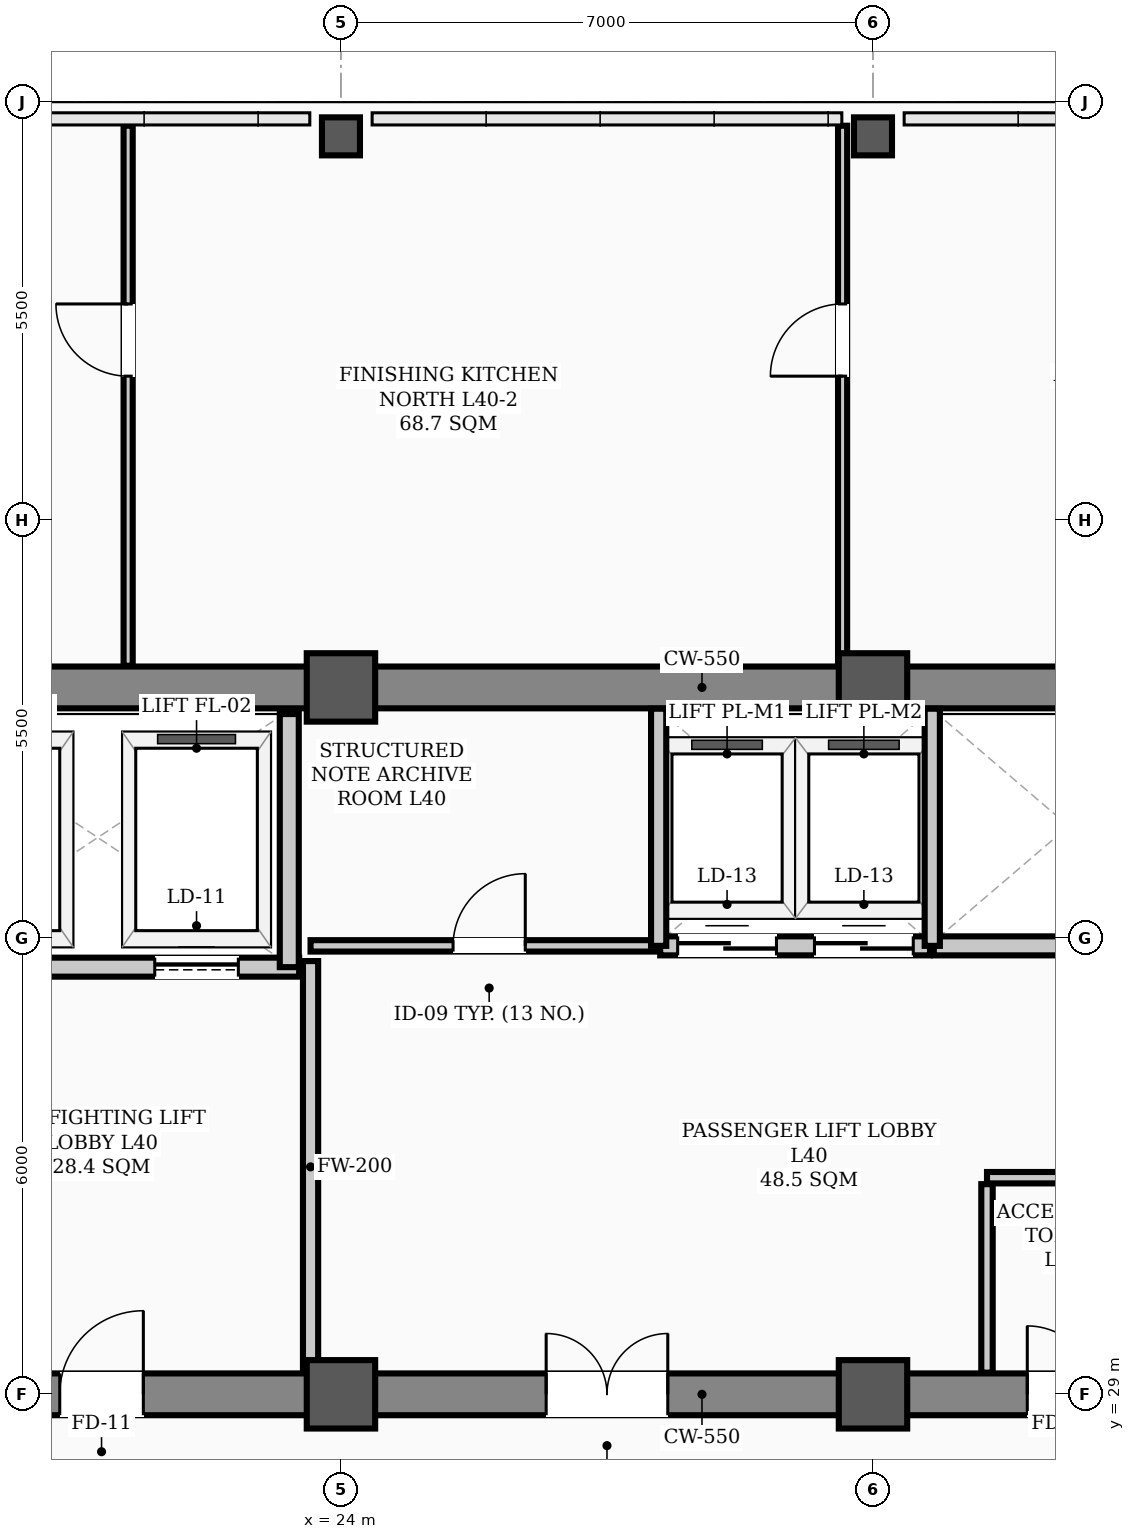
"""IFC4 building model, lengths in metres.
Left out: names, types, materials, properties, quantities, classifications, styles, units other than length and angle.
Written with IfcOpenShell. Run it as: python <this file> out.ifc"""

import sys

from ifc_helpers import new_model, si_unit, direction, frame, frame_2d, origin, origin_2d, place, context, subcontext, project, spatial, rectangle, hollow_rectangle, extrude, element, fill, save


model = new_model("IFC4")
c1 = context("Model", 3, precision=1e-05, world=origin(), true_north=direction((0.0, 1.0)))
c2 = subcontext(c1, "Body", "Model", "MODEL_VIEW")
j1 = project(units=[si_unit("LENGTHUNIT", "METRE"), si_unit("PLANEANGLEUNIT", "RADIAN")], contexts=[c1])
p1 = place(None, origin())
s1 = spatial("IfcSite", under=j1, at=p1, CompositionType="ELEMENT")
p2 = place(p1, origin())
s2 = spatial("IfcBuilding", under=s1, at=p2, CompositionType="ELEMENT")
p3 = place(p2, frame((0.0, 0.0, 161.7)))
s3 = spatial("IfcBuildingStorey", under=s2, at=p3, CompositionType="ELEMENT", Elevation=161.7)
for number, where, z_axis, x_axis in (
    (1, (24.0, 29.0, 0.0), (0.0, 0.0, 1.0), (1.0, 0.0, 0.0)),
    (2, (24.0, 38.3, 0.0), (0.0, 0.0, 1.0), (1.0, 0.0, 0.0)),
    (3, (31.0, 29.0, 0.0), (0.0, 0.0, 1.0), (1.0, 0.0, 0.0)),
    (4, (31.0, 38.3, 0.0), (0.0, 0.0, 1.0), (1.0, 0.0, 0.0)),
):
    element("IfcColumn", number, at=place(p3, frame(where, z_axis=z_axis, x_axis=x_axis)), inside=s3, PredefinedType="COLUMN", context=c2, shape_type="SweptSolid", body=[
        extrude(hollow_rectangle(XDim=0.9, YDim=0.9, WallThickness=0.035, InnerFilletRadius=0.017, OuterFilletRadius=0.052, at=origin_2d()), origin(), (0.0, 0.0, 1.0), 3.9),
    ])
for number, where, z_axis, x_axis in (
    (5, (24.0, 45.55, 0.0), (0.0, 0.0, 1.0), (1.0, 0.0, 0.0)),
    (6, (31.0, 45.55, 0.0), (0.0, 0.0, 1.0), (1.0, 0.0, 0.0)),
):
    element("IfcColumn", number, at=place(p3, frame(where, z_axis=z_axis, x_axis=x_axis)), inside=s3, PredefinedType="COLUMN", context=c2, shape_type="SweptSolid", body=[
        extrude(hollow_rectangle(XDim=0.5, YDim=0.5, WallThickness=0.024, InnerFilletRadius=0.012, OuterFilletRadius=0.036, at=origin_2d()), origin(), (0.0, 0.0, 1.0), 3.9),
    ])
p4 = place(p3, frame((13.5, 29.0, 0.0), z_axis=(0.0, 0.0, 1.0), x_axis=(1.0, 0.0, 0.0)))
e7 = element("IfcWall", 7, at=p4, inside=s3, PredefinedType="SHEAR", context=c2, shape_type="SweptSolid", body=[
    extrude(rectangle(XDim=30.5, YDim=0.55, at=frame_2d((15.25, 0.0))), origin(), (0.0, 0.0, 1.0), 3.72),
])
p5 = place(p4, frame((1.75, 0.0, 0.0)))
e8 = element("IfcOpeningElement", 8, at=p5, cuts=e7, PredefinedType="OPENING", context=c2, shape_type="SweptSolid", body=[
    extrude(rectangle(XDim=1.1, YDim=2.08, at=frame_2d((0.55, 1.04))), frame((0.0, 0.285, 0.0), z_axis=(0.0, -1.0, 0.0), x_axis=(1.0, 0.0, 0.0)), (0.0, 0.0, 1.0), 0.57),
])
p6 = place(p4, frame((26.7, 0.0, 0.0)))
e9 = element("IfcOpeningElement", 9, at=p6, cuts=e7, PredefinedType="OPENING", context=c2, shape_type="SweptSolid", body=[
    extrude(rectangle(XDim=1.1, YDim=2.08, at=frame_2d((0.55, 1.04))), frame((0.0, 0.285, 0.0), z_axis=(0.0, -1.0, 0.0), x_axis=(1.0, 0.0, 0.0)), (0.0, 0.0, 1.0), 0.57),
])
p7 = place(p4, frame((6.8, 0.0, 0.0)))
e10 = element("IfcOpeningElement", 10, at=p7, cuts=e7, PredefinedType="OPENING", context=c2, shape_type="SweptSolid", body=[
    extrude(rectangle(XDim=1.1, YDim=2.08, at=frame_2d((0.55, 1.04))), frame((0.0, 0.285, 0.0), z_axis=(0.0, -1.0, 0.0), x_axis=(1.0, 0.0, 0.0)), (0.0, 0.0, 1.0), 0.57),
])
p8 = place(p4, frame((13.2, 0.0, 0.0)))
e11 = element("IfcOpeningElement", 11, at=p8, cuts=e7, PredefinedType="OPENING", context=c2, shape_type="SweptSolid", body=[
    extrude(rectangle(XDim=1.6, YDim=2.08, at=frame_2d((0.8, 1.04))), frame((0.0, 0.285, 0.0), z_axis=(0.0, -1.0, 0.0), x_axis=(1.0, 0.0, 0.0)), (0.0, 0.0, 1.0), 0.57),
])
p9 = place(p4, frame((19.53, 0.0, 0.0)))
e12 = element("IfcOpeningElement", 12, at=p9, cuts=e7, PredefinedType="OPENING", context=c2, shape_type="SweptSolid", body=[
    extrude(rectangle(XDim=0.9, YDim=2.08, at=frame_2d((0.45, 1.04))), frame((0.0, 0.285, 0.0), z_axis=(0.0, -1.0, 0.0), x_axis=(1.0, 0.0, 0.0)), (0.0, 0.0, 1.0), 0.57),
])
p10 = place(p4, frame((21.57, 0.0, 0.0)))
e13 = element("IfcOpeningElement", 13, at=p10, cuts=e7, PredefinedType="OPENING", context=c2, shape_type="SweptSolid", body=[
    extrude(rectangle(XDim=0.9, YDim=2.08, at=frame_2d((0.45, 1.04))), frame((0.0, 0.285, 0.0), z_axis=(0.0, -1.0, 0.0), x_axis=(1.0, 0.0, 0.0)), (0.0, 0.0, 1.0), 0.57),
])
p11 = place(p3, frame((13.5, 38.3, 0.0), z_axis=(0.0, 0.0, 1.0), x_axis=(1.0, 0.0, 0.0)))
e14 = element("IfcWall", 14, at=p11, inside=s3, PredefinedType="SHEAR", context=c2, shape_type="SweptSolid", body=[
    extrude(rectangle(XDim=30.5, YDim=0.55, at=frame_2d((15.25, 0.0))), origin(), (0.0, 0.0, 1.0), 3.72),
])
p12 = place(p3, frame((18.1, 34.62, 0.0), z_axis=(0.0, 0.0, 1.0), x_axis=(1.0, 0.0, 0.0)))
e15 = element("IfcWall", 15, at=p12, inside=s3, PredefinedType="STANDARD", context=c2, shape_type="SweptSolid", body=[
    extrude(rectangle(XDim=5.35, YDim=0.25, at=frame_2d((2.675, 0.0))), origin(), (0.0, 0.0, 1.0), 3.72),
])
p13 = place(p12, frame((0.85, 0.0, 0.0)))
e16 = element("IfcOpeningElement", 16, at=p13, cuts=e15, PredefinedType="OPENING", context=c2, shape_type="SweptSolid", body=[
    extrude(rectangle(XDim=1.1, YDim=2.08, at=frame_2d((0.55, 1.04))), frame((0.0, 0.135, 0.0), z_axis=(0.0, -1.0, 0.0), x_axis=(1.0, 0.0, 0.0)), (0.0, 0.0, 1.0), 0.27),
])
p14 = place(p12, frame((3.45, 0.0, 0.0)))
e17 = element("IfcOpeningElement", 17, at=p14, cuts=e15, PredefinedType="OPENING", context=c2, shape_type="SweptSolid", body=[
    extrude(rectangle(XDim=1.1, YDim=2.08, at=frame_2d((0.55, 1.04))), frame((0.0, 0.135, 0.0), z_axis=(0.0, -1.0, 0.0), x_axis=(1.0, 0.0, 0.0)), (0.0, 0.0, 1.0), 0.27),
])
p15 = place(p3, frame((23.32, 34.62, 0.0), z_axis=(0.0, 0.0, 1.0), x_axis=(0.0, 1.0, 0.0)))
e18 = element("IfcWall", 18, at=p15, inside=s3, PredefinedType="STANDARD", context=c2, shape_type="SweptSolid", body=[
    extrude(rectangle(XDim=3.33, YDim=0.25, at=frame_2d((1.665, 0.0))), origin(), (0.0, 0.0, 1.0), 3.35),
])
p16 = place(p3, frame((28.2, 34.9, 0.0), z_axis=(0.0, 0.0, 1.0), x_axis=(1.0, 0.0, 0.0)))
e19 = element("IfcWall", 19, at=p16, inside=s3, PredefinedType="STANDARD", context=c2, shape_type="SweptSolid", body=[
    extrude(rectangle(XDim=3.55, YDim=0.25, at=frame_2d((1.775, 0.0))), origin(), (0.0, 0.0, 1.0), 3.72),
])
p17 = place(p16, frame((0.23, 0.0, 0.0)))
e20 = element("IfcOpeningElement", 20, at=p17, cuts=e19, PredefinedType="OPENING", context=c2, shape_type="SweptSolid", body=[
    extrude(rectangle(XDim=1.3, YDim=2.08, at=frame_2d((0.65, 1.04))), frame((0.0, 0.135, 0.0), z_axis=(0.0, -1.0, 0.0), x_axis=(1.0, 0.0, 0.0)), (0.0, 0.0, 1.0), 0.27),
])
p18 = place(p16, frame((2.03, 0.0, 0.0)))
e21 = element("IfcOpeningElement", 21, at=p18, cuts=e19, PredefinedType="OPENING", context=c2, shape_type="SweptSolid", body=[
    extrude(rectangle(XDim=1.3, YDim=2.08, at=frame_2d((0.65, 1.04))), frame((0.0, 0.135, 0.0), z_axis=(0.0, -1.0, 0.0), x_axis=(1.0, 0.0, 0.0)), (0.0, 0.0, 1.0), 0.27),
])
p19 = place(p3, frame((31.8, 34.9, 0.0), z_axis=(0.0, 0.0, 1.0), x_axis=(1.0, 0.0, 0.0)))
e22 = element("IfcWall", 22, at=p19, inside=s3, PredefinedType="STANDARD", context=c2, shape_type="SweptSolid", body=[
    extrude(rectangle(XDim=3.6, YDim=0.25, at=frame_2d((1.8, 0.0))), origin(), (0.0, 0.0, 1.0), 3.72),
])
p20 = place(p3, frame((23.6, 34.9, 0.0), z_axis=(0.0, 0.0, 1.0), x_axis=(1.0, 0.0, 0.0)))
e23 = element("IfcWall", 23, at=p20, inside=s3, PredefinedType="PARTITIONING", context=c2, shape_type="SweptSolid", body=[
    extrude(rectangle(XDim=4.58, YDim=0.15, at=frame_2d((2.29, 0.0))), origin(), (0.0, 0.0, 1.0), 3.72),
])
p21 = place(p20, frame((1.875, 0.0, 0.0)))
e24 = element("IfcOpeningElement", 24, at=p21, cuts=e23, PredefinedType="OPENING", context=c2, shape_type="SweptSolid", body=[
    extrude(rectangle(XDim=0.95, YDim=2.08, at=frame_2d((0.475, 1.04))), frame((0.0, 0.085, 0.0), z_axis=(0.0, -1.0, 0.0), x_axis=(1.0, 0.0, 0.0)), (0.0, 0.0, 1.0), 0.17),
])
p22 = place(p3, frame((32.5, 31.85, 0.0), z_axis=(0.0, 0.0, 1.0), x_axis=(1.0, 0.0, 0.0)))
e25 = element("IfcWall", 25, at=p22, inside=s3, PredefinedType="PARTITIONING", context=c2, shape_type="SweptSolid", body=[
    extrude(rectangle(XDim=4.1, YDim=0.15, at=frame_2d((2.05, 0.0))), origin(), (0.0, 0.0, 1.0), 3.72),
])
p23 = place(p3, frame((23.6, 29.285, 0.0), z_axis=(0.0, 0.0, 1.0), x_axis=(0.0, 1.0, 0.0)))
e26 = element("IfcWall", 26, at=p23, inside=s3, PredefinedType="STANDARD", context=c2, shape_type="SweptSolid", body=[
    extrude(rectangle(XDim=5.415, YDim=0.2, at=frame_2d((2.708, 0.0))), origin(), (0.0, 0.0, 1.0), 3.2),
])
p24 = place(p3, frame((32.5, 29.285, 0.0), z_axis=(0.0, 0.0, 1.0), x_axis=(0.0, 1.0, 0.0)))
e27 = element("IfcWall", 27, at=p24, inside=s3, PredefinedType="PARTITIONING", context=c2, shape_type="SweptSolid", body=[
    extrude(rectangle(XDim=2.48, YDim=0.15, at=frame_2d((1.24, 0.0))), origin(), (0.0, 0.0, 1.0), 3.35),
])
p25 = place(p3, frame((21.2, 38.585, 0.0), z_axis=(0.0, 0.0, 1.0), x_axis=(0.0, 1.0, 0.0)))
e28 = element("IfcWall", 28, at=p25, inside=s3, PredefinedType="PARTITIONING", context=c2, shape_type="SweptSolid", body=[
    extrude(rectangle(XDim=7.105, YDim=0.12, at=frame_2d((3.552, 0.0))), origin(), (0.0, 0.0, 1.0), 3.212),
])
p26 = place(p25, frame((3.81, 0.0, 0.0)))
e29 = element("IfcOpeningElement", 29, at=p26, cuts=e28, PredefinedType="OPENING", context=c2, shape_type="SweptSolid", body=[
    extrude(rectangle(XDim=0.95, YDim=2.08, at=frame_2d((0.475, 1.04))), frame((0.0, 0.07, 0.0), z_axis=(0.0, -1.0, 0.0), x_axis=(1.0, 0.0, 0.0)), (0.0, 0.0, 1.0), 0.14),
])
p27 = place(p3, frame((30.6, 38.585, 0.0), z_axis=(0.0, 0.0, 1.0), x_axis=(0.0, 1.0, 0.0)))
e30 = element("IfcWall", 30, at=p27, inside=s3, PredefinedType="PARTITIONING", context=c2, shape_type="SweptSolid", body=[
    extrude(rectangle(XDim=7.105, YDim=0.12, at=frame_2d((3.552, 0.0))), origin(), (0.0, 0.0, 1.0), 3.2),
])
p28 = place(p27, frame((3.81, 0.0, 0.0)))
e31 = element("IfcOpeningElement", 31, at=p28, cuts=e30, PredefinedType="OPENING", context=c2, shape_type="SweptSolid", body=[
    extrude(rectangle(XDim=0.95, YDim=2.08, at=frame_2d((0.475, 1.04))), frame((0.0, 0.07, 0.0), z_axis=(0.0, -1.0, 0.0), x_axis=(1.0, 0.0, 0.0)), (0.0, 0.0, 1.0), 0.14),
])
for number, where, z_axis, x_axis in (
    (32, (28.18, 34.9, 0.0), (0.0, 0.0, 1.0), (0.0, 1.0, 0.0)),
    (33, (31.78, 34.9, 0.0), (0.0, 0.0, 1.0), (0.0, 1.0, 0.0)),
):
    element("IfcWall", number, at=place(p3, frame(where, z_axis=z_axis, x_axis=x_axis)), inside=s3, PredefinedType="STANDARD", context=c2, shape_type="SweptSolid", body=[
        extrude(rectangle(XDim=3.12, YDim=0.2, at=frame_2d((1.56, 0.0))), origin(), (0.0, 0.0, 1.0), 3.35),
    ])
p29 = place(p7, origin())
e34 = element("IfcDoor", 34, at=p29, inside=s3, OperationType="SINGLE_SWING_RIGHT", PredefinedType="DOOR", context=c2, shape_type="SweptSolid", body=[
    extrude(rectangle(XDim=1.1, YDim=2.08, at=frame_2d((0.55, 1.04))), frame((0.0, 0.025, 0.0), z_axis=(0.0, -1.0, 0.0), x_axis=(1.0, 0.0, 0.0)), (0.0, 0.0, 1.0), 0.05),
])
fill(e10, e34)
p30 = place(p8, origin())
e35 = element("IfcDoor", 35, at=p30, inside=s3, OperationType="DOUBLE_DOOR_SINGLE_SWING", PredefinedType="DOOR", context=c2, shape_type="SweptSolid", body=[
    extrude(rectangle(XDim=1.6, YDim=2.08, at=frame_2d((0.8, 1.04))), frame((0.0, 0.025, 0.0), z_axis=(0.0, -1.0, 0.0), x_axis=(1.0, 0.0, 0.0)), (0.0, 0.0, 1.0), 0.05),
])
fill(e11, e35)
p31 = place(p21, origin())
e36 = element("IfcDoor", 36, at=p31, inside=s3, OperationType="SINGLE_SWING_RIGHT", PredefinedType="DOOR", context=c2, shape_type="SweptSolid", body=[
    extrude(rectangle(XDim=0.95, YDim=2.08, at=frame_2d((0.475, 1.04))), frame((0.0, 0.025, 0.0), z_axis=(0.0, -1.0, 0.0), x_axis=(1.0, 0.0, 0.0)), (0.0, 0.0, 1.0), 0.05),
])
fill(e24, e36)
p32 = place(p9, origin())
e37 = element("IfcDoor", 37, at=p32, inside=s3, OperationType="SINGLE_SWING_LEFT", PredefinedType="DOOR", context=c2, shape_type="SweptSolid", body=[
    extrude(rectangle(XDim=0.9, YDim=2.08, at=frame_2d((0.45, 1.04))), frame((0.0, 0.025, 0.0), z_axis=(0.0, -1.0, 0.0), x_axis=(1.0, 0.0, 0.0)), (0.0, 0.0, 1.0), 0.05),
])
fill(e12, e37)
p33 = place(p26, origin())
e38 = element("IfcDoor", 38, at=p33, inside=s3, OperationType="SINGLE_SWING_RIGHT", PredefinedType="DOOR", context=c2, shape_type="SweptSolid", body=[
    extrude(rectangle(XDim=0.95, YDim=2.08, at=frame_2d((0.475, 1.04))), frame((0.0, 0.025, 0.0), z_axis=(0.0, -1.0, 0.0), x_axis=(1.0, 0.0, 0.0)), (0.0, 0.0, 1.0), 0.05),
])
fill(e29, e38)
p34 = place(p28, origin())
e39 = element("IfcDoor", 39, at=p34, inside=s3, OperationType="SINGLE_SWING_LEFT", PredefinedType="DOOR", context=c2, shape_type="SweptSolid", body=[
    extrude(rectangle(XDim=0.95, YDim=2.08, at=frame_2d((0.475, 1.04))), frame((0.0, 0.025, 0.0), z_axis=(0.0, -1.0, 0.0), x_axis=(1.0, 0.0, 0.0)), (0.0, 0.0, 1.0), 0.05),
])
fill(e31, e39)
p35 = place(p14, origin())
e40 = element("IfcDoor", 40, at=p35, inside=s3, OperationType="SLIDING_TO_LEFT", PredefinedType="DOOR", context=c2, shape_type="SweptSolid", body=[
    extrude(rectangle(XDim=1.1, YDim=2.08, at=frame_2d((0.55, 1.04))), frame((0.0, 0.025, 0.0), z_axis=(0.0, -1.0, 0.0), x_axis=(1.0, 0.0, 0.0)), (0.0, 0.0, 1.0), 0.05),
])
fill(e17, e40)
p36 = place(p17, origin())
e41 = element("IfcDoor", 41, at=p36, inside=s3, OperationType="DOUBLE_DOOR_SLIDING", PredefinedType="DOOR", context=c2, shape_type="SweptSolid", body=[
    extrude(rectangle(XDim=1.3, YDim=2.08, at=frame_2d((0.65, 1.04))), frame((0.0, 0.025, 0.0), z_axis=(0.0, -1.0, 0.0), x_axis=(1.0, 0.0, 0.0)), (0.0, 0.0, 1.0), 0.05),
])
fill(e20, e41)
p37 = place(p18, origin())
e42 = element("IfcDoor", 42, at=p37, inside=s3, OperationType="DOUBLE_DOOR_SLIDING", PredefinedType="DOOR", context=c2, shape_type="SweptSolid", body=[
    extrude(rectangle(XDim=1.3, YDim=2.08, at=frame_2d((0.65, 1.04))), frame((0.0, 0.025, 0.0), z_axis=(0.0, -1.0, 0.0), x_axis=(1.0, 0.0, 0.0)), (0.0, 0.0, 1.0), 0.05),
])
fill(e21, e42)
save(model, sys.argv[1])
